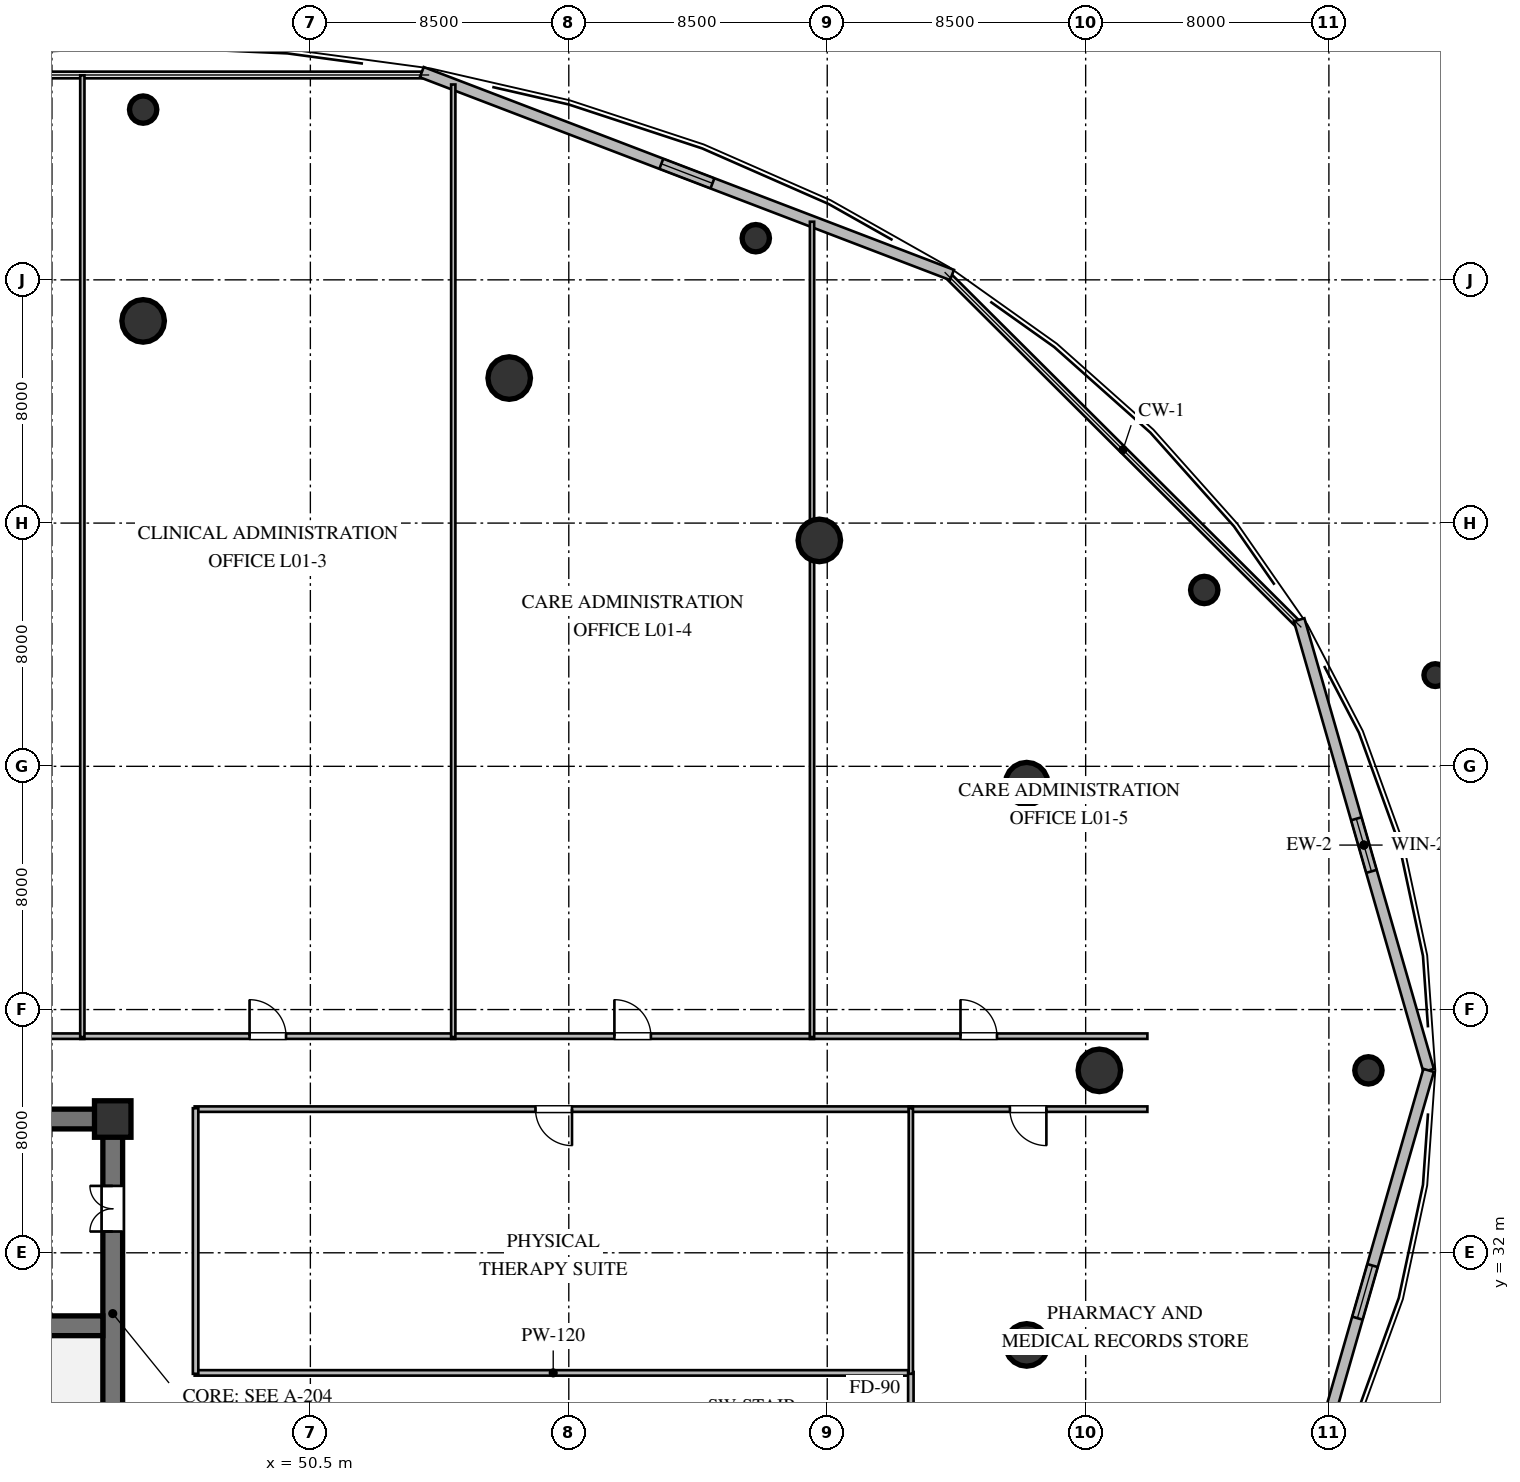
"""IFC4 building model, lengths in metres.
Left out: names, types, materials, properties, quantities, classifications, styles, units other than length and angle.
Written with IfcOpenShell. Run it as: python <this file> out.ifc"""

import sys

from ifc_helpers import new_model, si_unit, direction, frame, frame_2d, origin, origin_2d, place, context, subcontext, project, spatial, rectangle, circle, extrude, element, fill, save


model = new_model("IFC4")
c1 = context("Model", 3, precision=1e-05, world=origin(), true_north=direction((0.0, 1.0)))
c2 = subcontext(c1, "Body", "Model", "MODEL_VIEW")
j1 = project(units=[si_unit("LENGTHUNIT", "METRE"), si_unit("PLANEANGLEUNIT", "RADIAN")], contexts=[c1])
p1 = place(None, origin())
s1 = spatial("IfcSite", under=j1, at=p1, CompositionType="ELEMENT")
p2 = place(p1, origin())
s2 = spatial("IfcBuilding", under=s1, at=p2, CompositionType="ELEMENT")
p3 = place(p2, frame((0.0, 0.0, 4.8)))
s3 = spatial("IfcBuildingStorey", under=s2, at=p3, CompositionType="ELEMENT", Elevation=4.8)
p4 = place(p3, frame((21.675, 36.4, 0.0), z_axis=(0.0, 0.0, 1.0), x_axis=(1.0, 0.0, 0.0)))
e1 = element("IfcWall", 1, at=p4, inside=s3, PredefinedType="SHEAR", context=c2, shape_type="SweptSolid", body=[
    extrude(rectangle(XDim=22.65, YDim=0.65, at=frame_2d((11.325, 0.0))), origin(), (0.0, 0.0, 1.0), 4.52),
])
p5 = place(p3, frame((44.0, 23.925, 0.0), z_axis=(0.0, 0.0, 1.0), x_axis=(0.0, 1.0, 0.0)))
e2 = element("IfcWall", 2, at=p5, inside=s3, PredefinedType="SHEAR", context=c2, shape_type="SweptSolid", body=[
    extrude(rectangle(XDim=12.15, YDim=0.65, at=frame_2d((6.075, 0.0))), origin(), (0.0, 0.0, 1.0), 4.52),
])
p6 = place(p5, frame((8.775, 0.0, 0.0)))
e3 = element("IfcOpeningElement", 3, at=p6, cuts=e2, PredefinedType="OPENING", context=c2, shape_type="SweptSolid", body=[
    extrude(rectangle(XDim=1.5, YDim=2.15, at=frame_2d((0.75, 1.075))), frame((0.0, 0.335, 0.0), z_axis=(0.0, -1.0, 0.0), x_axis=(1.0, 0.0, 0.0)), (0.0, 0.0, 1.0), 0.67),
])
p7 = place(p3, frame((22.325, 29.6, 0.0), z_axis=(0.0, 0.0, 1.0), x_axis=(1.0, 0.0, 0.0)))
e4 = element("IfcWall", 4, at=p7, inside=s3, PredefinedType="SHEAR", context=c2, shape_type="SweptSolid", body=[
    extrude(rectangle(XDim=21.35, YDim=0.65, at=frame_2d((10.675, 0.0))), origin(), (0.0, 0.0, 1.0), 4.52),
])
p8 = place(p7, frame((12.125, 0.0, 0.0)))
e5 = element("IfcOpeningElement", 5, at=p8, cuts=e4, PredefinedType="OPENING", context=c2, shape_type="SweptSolid", body=[
    extrude(rectangle(XDim=1.15, YDim=2.1, at=frame_2d((0.575, 1.05))), frame((0.0, 0.335, 0.0), z_axis=(0.0, -1.0, 0.0), x_axis=(1.0, 0.0, 0.0)), (0.0, 0.0, 1.0), 0.67),
])
p9 = place(p3, frame((44.0, 36.4, 0.0), z_axis=(0.0, 0.0, 1.0), x_axis=(1.0, 0.0, 0.0)))
e6 = element("IfcColumn", 6, at=p9, inside=s3, PredefinedType="COLUMN", context=c2, shape_type="SweptSolid", body=[
    extrude(rectangle(XDim=1.2, YDim=1.2, at=origin_2d()), origin(), (0.0, 0.0, 1.0), 4.8),
])
for number, where, z_axis, x_axis in (
    (7, (76.45, 38.0, 0.0), (0.0, 0.0, 1.0), (1.0, 0.0, 0.0)),
    (8, (74.06, 47.43, 0.0), (0.0, 0.0, 1.0), (1.0, 0.0, 0.0)),
    (9, (67.24, 55.43, 0.0), (0.0, 0.0, 1.0), (1.0, 0.0, 0.0)),
    (10, (57.04, 60.77, 0.0), (0.0, 0.0, 1.0), (1.0, 0.0, 0.0)),
    (11, (45.0, 62.65, 0.0), (0.0, 0.0, 1.0), (1.0, 0.0, 0.0)),
    (12, (74.06, 28.97, 0.0), (0.0, 0.0, 1.0), (1.0, 0.0, 0.0)),
):
    element("IfcColumn", number, at=place(p3, frame(where, z_axis=z_axis, x_axis=x_axis)), inside=s3, PredefinedType="COLUMN", context=c2, shape_type="SweptSolid", body=[
        extrude(circle(Radius=0.7, at=origin_2d()), origin(), (0.0, 0.0, 1.0), 4.8),
    ])
for number, where, z_axis, x_axis in (
    (13, (85.3, 38.0, 0.0), (0.0, 0.0, 1.0), (1.0, 0.0, 0.0)),
    (14, (79.9, 53.8, 0.0), (0.0, 0.0, 1.0), (1.0, 0.0, 0.0)),
    (15, (65.15, 65.37, 0.0), (0.0, 0.0, 1.0), (1.0, 0.0, 0.0)),
    (16, (45.0, 69.6, 0.0), (0.0, 0.0, 1.0), (1.0, 0.0, 0.0)),
):
    element("IfcColumn", number, at=place(p3, frame(where, z_axis=z_axis, x_axis=x_axis)), inside=s3, PredefinedType="COLUMN", context=c2, shape_type="SweptSolid", body=[
        extrude(circle(Radius=0.45, at=origin_2d()), origin(), (0.0, 0.0, 1.0), 4.8),
    ])
p10 = place(p3, frame((87.5, 51.0, 0.0), z_axis=(0.0, 0.0, 1.0), x_axis=(1.0, 0.0, 0.0)))
e17 = element("IfcColumn", 17, at=p10, inside=s3, PredefinedType="COLUMN", context=c2, shape_type="SweptSolid", body=[
    extrude(circle(Radius=0.375, at=origin_2d()), origin(), (0.0, 0.0, 1.0), 4.8),
])
p11 = place(p3, frame((87.28, 38.0, 0.0), z_axis=(0.0, 0.0, 1.0), x_axis=(-0.276203409751, 0.961099202186, 0.0)))
e18 = element("IfcWall", 18, at=p11, inside=s3, PredefinedType="STANDARD", context=c2, shape_type="SweptSolid", body=[
    extrude(rectangle(XDim=15.42, YDim=0.36, at=frame_2d((7.71, 0.0))), origin(), (0.0, 0.0, 1.0), 4.52),
])
p12 = place(p11, frame((6.81, 0.0, 1.05)))
e19 = element("IfcOpeningElement", 19, at=p12, cuts=e18, PredefinedType="OPENING", context=c2, shape_type="SweptSolid", body=[
    extrude(rectangle(XDim=1.8, YDim=1.7, at=frame_2d((0.9, 0.85))), frame((0.0, 0.19, 0.0), z_axis=(0.0, -1.0, 0.0), x_axis=(1.0, 0.0, 0.0)), (0.0, 0.0, 1.0), 0.38),
])
p13 = place(p3, frame((71.604, 64.161, 0.0), z_axis=(0.0, 0.0, 1.0), x_axis=(-0.934010262022, 0.357246176238, 0.0)))
e20 = element("IfcWall", 20, at=p13, inside=s3, PredefinedType="STANDARD", context=c2, shape_type="SweptSolid", body=[
    extrude(rectangle(XDim=18.671, YDim=0.36, at=frame_2d((9.335, 0.0))), origin(), (0.0, 0.0, 1.0), 4.52),
])
p14 = place(p13, frame((8.436, 0.0, 1.05)))
e21 = element("IfcOpeningElement", 21, at=p14, cuts=e20, PredefinedType="OPENING", context=c2, shape_type="SweptSolid", body=[
    extrude(rectangle(XDim=1.8, YDim=1.7, at=frame_2d((0.9, 0.85))), frame((0.0, 0.19, 0.0), z_axis=(0.0, -1.0, 0.0), x_axis=(1.0, 0.0, 0.0)), (0.0, 0.0, 1.0), 0.38),
])
p15 = place(p3, frame((83.093, 23.43, 0.0), z_axis=(0.0, 0.0, 1.0), x_axis=(0.276192699339, 0.961102280109, 0.0)))
e22 = element("IfcWall", 22, at=p15, inside=s3, PredefinedType="STANDARD", context=c2, shape_type="SweptSolid", body=[
    extrude(rectangle(XDim=15.16, YDim=0.36, at=frame_2d((7.58, 0.0))), origin(), (0.0, 0.0, 1.0), 4.52),
])
p16 = place(p15, frame((6.68, 0.0, 1.05)))
e23 = element("IfcOpeningElement", 23, at=p16, cuts=e22, PredefinedType="OPENING", context=c2, shape_type="SweptSolid", body=[
    extrude(rectangle(XDim=1.8, YDim=1.7, at=frame_2d((0.9, 0.85))), frame((0.0, 0.19, 0.0), z_axis=(0.0, -1.0, 0.0), x_axis=(1.0, 0.0, 0.0)), (0.0, 0.0, 1.0), 0.38),
])
p17 = place(p3, frame((31.135, 39.125, 0.0), z_axis=(0.0, 0.0, 1.0), x_axis=(1.0, 0.0, 0.0)))
e24 = element("IfcWall", 24, at=p17, inside=s3, PredefinedType="PARTITIONING", context=c2, shape_type="SweptSolid", body=[
    extrude(rectangle(XDim=11.93, YDim=0.18, at=frame_2d((5.965, 0.0))), origin(), (0.0, 0.0, 1.0), 4.52),
])
p18 = place(p17, frame((5.365, 0.0, 0.0)))
e25 = element("IfcOpeningElement", 25, at=p18, cuts=e24, PredefinedType="OPENING", context=c2, shape_type="SweptSolid", body=[
    extrude(rectangle(XDim=1.2, YDim=2.15, at=frame_2d((0.6, 1.075))), frame((0.0, 0.1, 0.0), z_axis=(0.0, -1.0, 0.0), x_axis=(1.0, 0.0, 0.0)), (0.0, 0.0, 1.0), 0.2),
])
p19 = place(p3, frame((42.935, 39.125, 0.0), z_axis=(0.0, 0.0, 1.0), x_axis=(1.0, 0.0, 0.0)))
e26 = element("IfcWall", 26, at=p19, inside=s3, PredefinedType="PARTITIONING", context=c2, shape_type="SweptSolid", body=[
    extrude(rectangle(XDim=12.33, YDim=0.18, at=frame_2d((6.165, 0.0))), origin(), (0.0, 0.0, 1.0), 4.52),
])
p20 = place(p19, frame((5.565, 0.0, 0.0)))
e27 = element("IfcOpeningElement", 27, at=p20, cuts=e26, PredefinedType="OPENING", context=c2, shape_type="SweptSolid", body=[
    extrude(rectangle(XDim=1.2, YDim=2.15, at=frame_2d((0.6, 1.075))), frame((0.0, 0.1, 0.0), z_axis=(0.0, -1.0, 0.0), x_axis=(1.0, 0.0, 0.0)), (0.0, 0.0, 1.0), 0.2),
])
p21 = place(p3, frame((55.135, 39.125, 0.0), z_axis=(0.0, 0.0, 1.0), x_axis=(1.0, 0.0, 0.0)))
e28 = element("IfcWall", 28, at=p21, inside=s3, PredefinedType="PARTITIONING", context=c2, shape_type="SweptSolid", body=[
    extrude(rectangle(XDim=11.93, YDim=0.18, at=frame_2d((5.965, 0.0))), origin(), (0.0, 0.0, 1.0), 4.52),
])
p22 = place(p21, frame((5.365, 0.0, 0.0)))
e29 = element("IfcOpeningElement", 29, at=p22, cuts=e28, PredefinedType="OPENING", context=c2, shape_type="SweptSolid", body=[
    extrude(rectangle(XDim=1.2, YDim=2.15, at=frame_2d((0.6, 1.075))), frame((0.0, 0.1, 0.0), z_axis=(0.0, -1.0, 0.0), x_axis=(1.0, 0.0, 0.0)), (0.0, 0.0, 1.0), 0.2),
])
p23 = place(p3, frame((66.935, 39.125, 0.0), z_axis=(0.0, 0.0, 1.0), x_axis=(1.0, 0.0, 0.0)))
e30 = element("IfcWall", 30, at=p23, inside=s3, PredefinedType="PARTITIONING", context=c2, shape_type="SweptSolid", body=[
    extrude(rectangle(XDim=11.095, YDim=0.18, at=frame_2d((5.547, 0.0))), origin(), (0.0, 0.0, 1.0), 4.52),
])
p24 = place(p23, frame((4.948, 0.0, 0.0)))
e31 = element("IfcOpeningElement", 31, at=p24, cuts=e30, PredefinedType="OPENING", context=c2, shape_type="SweptSolid", body=[
    extrude(rectangle(XDim=1.2, YDim=2.15, at=frame_2d((0.6, 1.075))), frame((0.0, 0.1, 0.0), z_axis=(0.0, -1.0, 0.0), x_axis=(1.0, 0.0, 0.0)), (0.0, 0.0, 1.0), 0.2),
])
p25 = place(p3, frame((70.315, 36.725, 0.0), z_axis=(0.0, 0.0, 1.0), x_axis=(-1.0, 0.0, 0.0)))
e32 = element("IfcWall", 32, at=p25, inside=s3, PredefinedType="PARTITIONING", context=c2, shape_type="SweptSolid", body=[
    extrude(rectangle(XDim=23.62, YDim=0.18, at=frame_2d((11.81, 0.0))), origin(), (0.0, 0.0, 1.0), 4.05),
])
p26 = place(p25, frame((11.21, 0.0, 0.0)))
e33 = element("IfcOpeningElement", 33, at=p26, cuts=e32, PredefinedType="OPENING", context=c2, shape_type="SweptSolid", body=[
    extrude(rectangle(XDim=1.2, YDim=2.15, at=frame_2d((0.6, 1.075))), frame((0.0, 0.1, 0.0), z_axis=(0.0, -1.0, 0.0), x_axis=(1.0, 0.0, 0.0)), (0.0, 0.0, 1.0), 0.2),
])
p27 = place(p3, frame((46.695, 28.05, 0.0), z_axis=(0.0, 0.0, 1.0), x_axis=(1.0, 0.0, 0.0)))
e34 = element("IfcWall", 34, at=p27, inside=s3, PredefinedType="PARTITIONING", context=c2, shape_type="SweptSolid", body=[
    extrude(rectangle(XDim=23.585, YDim=0.18, at=frame_2d((11.792, 0.0))), origin(), (0.0, 0.0, 1.0), 4.05),
])
p28 = place(p3, frame((46.725, 36.755, 0.0), z_axis=(0.0, 0.0, 1.0), x_axis=(0.0, -1.0, 0.0)))
e35 = element("IfcWall", 35, at=p28, inside=s3, PredefinedType="PARTITIONING", context=c2, shape_type="SweptSolid", body=[
    extrude(rectangle(XDim=8.735, YDim=0.18, at=frame_2d((4.367, 0.0))), origin(), (0.0, 0.0, 1.0), 4.52),
])
p29 = place(p3, frame((78.03, 36.725, 0.0), z_axis=(0.0, 0.0, 1.0), x_axis=(-1.0, 0.0, 0.0)))
e36 = element("IfcWall", 36, at=p29, inside=s3, PredefinedType="PARTITIONING", context=c2, shape_type="SweptSolid", body=[
    extrude(rectangle(XDim=7.845, YDim=0.18, at=frame_2d((3.922, 0.0))), origin(), (0.0, 0.0, 1.0), 4.52),
])
p30 = place(p29, frame((3.322, 0.0, 0.0)))
e37 = element("IfcOpeningElement", 37, at=p30, cuts=e36, PredefinedType="OPENING", context=c2, shape_type="SweptSolid", body=[
    extrude(rectangle(XDim=1.2, YDim=2.15, at=frame_2d((0.6, 1.075))), frame((0.0, 0.1, 0.0), z_axis=(0.0, -1.0, 0.0), x_axis=(1.0, 0.0, 0.0)), (0.0, 0.0, 1.0), 0.2),
])
p31 = place(p3, frame((70.25, 28.08, 0.0), z_axis=(0.0, 0.0, 1.0), x_axis=(0.0, -1.0, 0.0)))
e38 = element("IfcWall", 38, at=p31, inside=s3, PredefinedType="PARTITIONING", context=c2, shape_type="SweptSolid", body=[
    extrude(rectangle(XDim=2.46, YDim=0.18, at=frame_2d((1.23, 0.0))), origin(), (0.0, 0.0, 1.0), 4.52),
])
p32 = place(p3, frame((43.0, 70.728, 0.0), z_axis=(0.0, 0.0, 1.0), x_axis=(0.0, -1.0, 0.0)))
e39 = element("IfcWall", 39, at=p32, inside=s3, PredefinedType="PARTITIONING", context=c2, shape_type="SweptSolid", body=[
    extrude(rectangle(XDim=31.633, YDim=0.14, at=frame_2d((15.816, 0.0))), origin(), (0.0, 0.0, 1.0), 4.52),
])
p33 = place(p3, frame((55.2, 70.425, 0.0), z_axis=(0.0, 0.0, 1.0), x_axis=(0.0, -1.0, 0.0)))
e40 = element("IfcWall", 40, at=p33, inside=s3, PredefinedType="PARTITIONING", context=c2, shape_type="SweptSolid", body=[
    extrude(rectangle(XDim=31.33, YDim=0.14, at=frame_2d((15.665, 0.0))), origin(), (0.0, 0.0, 1.0), 4.52),
])
p34 = place(p3, frame((67.0, 65.912, 0.0), z_axis=(0.0, 0.0, 1.0), x_axis=(0.0, -1.0, 0.0)))
e41 = element("IfcWall", 41, at=p34, inside=s3, PredefinedType="PARTITIONING", context=c2, shape_type="SweptSolid", body=[
    extrude(rectangle(XDim=26.817, YDim=0.14, at=frame_2d((13.408, 0.0))), origin(), (0.0, 0.0, 1.0), 4.52),
])
p35 = place(p3, frame((70.25, 36.755, 0.0), z_axis=(0.0, 0.0, 1.0), x_axis=(0.0, -1.0, 0.0)))
e42 = element("IfcWall", 42, at=p35, inside=s3, PredefinedType="PARTITIONING", context=c2, shape_type="SweptSolid", body=[
    extrude(rectangle(XDim=8.735, YDim=0.14, at=frame_2d((4.367, 0.0))), origin(), (0.0, 0.0, 1.0), 4.52),
])
p36 = place(p12, origin())
e43 = element("IfcWindow", 43, at=p36, inside=s3, PartitioningType="SINGLE_PANEL", PredefinedType="WINDOW", context=c2, shape_type="SweptSolid", body=[
    extrude(rectangle(XDim=1.8, YDim=1.7, at=frame_2d((0.9, 0.85))), frame((0.0, 0.03, 0.0), z_axis=(0.0, -1.0, 0.0), x_axis=(1.0, 0.0, 0.0)), (0.0, 0.0, 1.0), 0.06),
])
fill(e19, e43)
p37 = place(p14, origin())
e44 = element("IfcWindow", 44, at=p37, inside=s3, PartitioningType="SINGLE_PANEL", PredefinedType="WINDOW", context=c2, shape_type="SweptSolid", body=[
    extrude(rectangle(XDim=1.8, YDim=1.7, at=frame_2d((0.9, 0.85))), frame((0.0, 0.03, 0.0), z_axis=(0.0, -1.0, 0.0), x_axis=(1.0, 0.0, 0.0)), (0.0, 0.0, 1.0), 0.06),
])
fill(e21, e44)
p38 = place(p16, origin())
e45 = element("IfcWindow", 45, at=p38, inside=s3, PartitioningType="SINGLE_PANEL", PredefinedType="WINDOW", context=c2, shape_type="SweptSolid", body=[
    extrude(rectangle(XDim=1.8, YDim=1.7, at=frame_2d((0.9, 0.85))), frame((0.0, 0.03, 0.0), z_axis=(0.0, -1.0, 0.0), x_axis=(1.0, 0.0, 0.0)), (0.0, 0.0, 1.0), 0.06),
])
fill(e23, e45)
p39 = place(p6, origin())
e46 = element("IfcDoor", 46, at=p39, inside=s3, OperationType="DOUBLE_DOOR_SINGLE_SWING", PredefinedType="DOOR", context=c2, shape_type="SweptSolid", body=[
    extrude(rectangle(XDim=1.5, YDim=2.15, at=frame_2d((0.75, 1.075))), frame((0.0, 0.025, 0.0), z_axis=(0.0, -1.0, 0.0), x_axis=(1.0, 0.0, 0.0)), (0.0, 0.0, 1.0), 0.05),
])
fill(e3, e46)
p40 = place(p20, origin())
e47 = element("IfcDoor", 47, at=p40, inside=s3, OperationType="SINGLE_SWING_LEFT", PredefinedType="DOOR", context=c2, shape_type="SweptSolid", body=[
    extrude(rectangle(XDim=1.2, YDim=2.15, at=frame_2d((0.6, 1.075))), frame((0.0, 0.025, 0.0), z_axis=(0.0, -1.0, 0.0), x_axis=(1.0, 0.0, 0.0)), (0.0, 0.0, 1.0), 0.05),
])
fill(e27, e47)
p41 = place(p22, origin())
e48 = element("IfcDoor", 48, at=p41, inside=s3, OperationType="SINGLE_SWING_LEFT", PredefinedType="DOOR", context=c2, shape_type="SweptSolid", body=[
    extrude(rectangle(XDim=1.2, YDim=2.15, at=frame_2d((0.6, 1.075))), frame((0.0, 0.025, 0.0), z_axis=(0.0, -1.0, 0.0), x_axis=(1.0, 0.0, 0.0)), (0.0, 0.0, 1.0), 0.05),
])
fill(e29, e48)
p42 = place(p24, origin())
e49 = element("IfcDoor", 49, at=p42, inside=s3, OperationType="SINGLE_SWING_LEFT", PredefinedType="DOOR", context=c2, shape_type="SweptSolid", body=[
    extrude(rectangle(XDim=1.2, YDim=2.15, at=frame_2d((0.6, 1.075))), frame((0.0, 0.025, 0.0), z_axis=(0.0, -1.0, 0.0), x_axis=(1.0, 0.0, 0.0)), (0.0, 0.0, 1.0), 0.05),
])
fill(e31, e49)
p43 = place(p26, origin())
e50 = element("IfcDoor", 50, at=p43, inside=s3, OperationType="SINGLE_SWING_LEFT", PredefinedType="DOOR", context=c2, shape_type="SweptSolid", body=[
    extrude(rectangle(XDim=1.2, YDim=2.15, at=frame_2d((0.6, 1.075))), frame((0.0, 0.025, 0.0), z_axis=(0.0, -1.0, 0.0), x_axis=(1.0, 0.0, 0.0)), (0.0, 0.0, 1.0), 0.05),
])
fill(e33, e50)
p44 = place(p30, origin())
e51 = element("IfcDoor", 51, at=p44, inside=s3, OperationType="SINGLE_SWING_LEFT", PredefinedType="DOOR", context=c2, shape_type="SweptSolid", body=[
    extrude(rectangle(XDim=1.2, YDim=2.15, at=frame_2d((0.6, 1.075))), frame((0.0, 0.025, 0.0), z_axis=(0.0, -1.0, 0.0), x_axis=(1.0, 0.0, 0.0)), (0.0, 0.0, 1.0), 0.05),
])
fill(e37, e51)
save(model, sys.argv[1])
